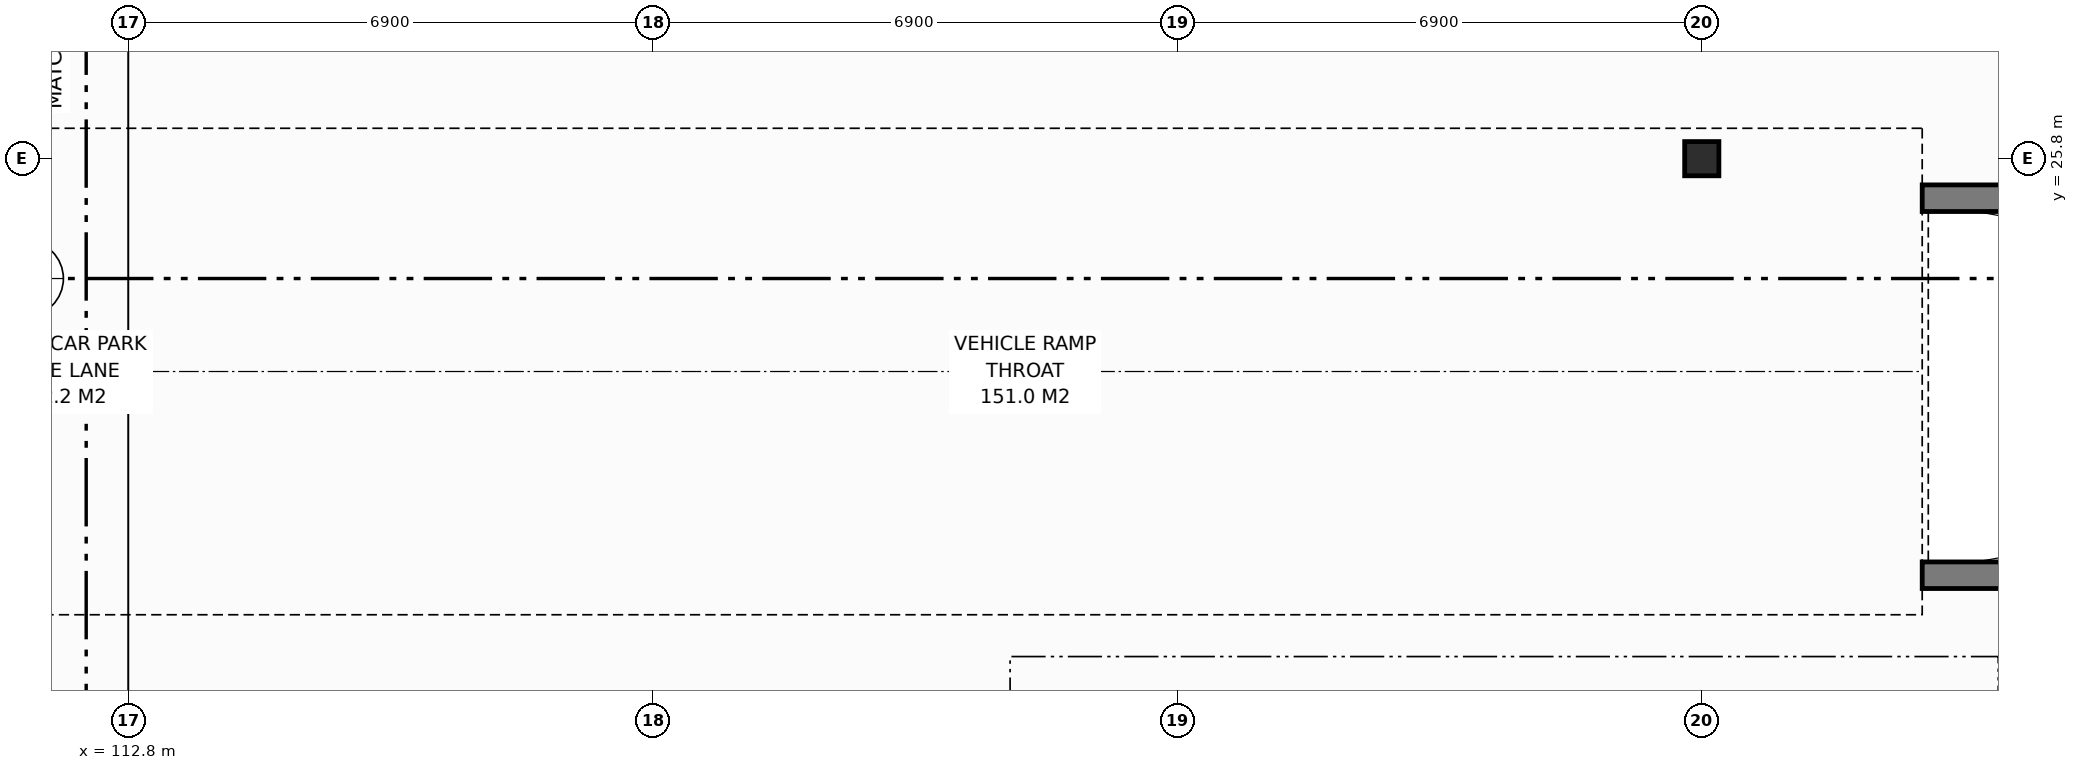
"""IFC4 building model, lengths in metres.
Left out: names, types, materials, properties, quantities, classifications, styles, units other than length and angle.
Written with IfcOpenShell. Run it as: python <this file> out.ifc"""

import sys

from ifc_helpers import new_model, si_unit, direction, frame, frame_2d, origin, origin_2d, place, context, subcontext, project, spatial, rectangle, extrude, element, save


model = new_model("IFC4")
c1 = context("Model", 3, precision=1e-05, world=origin(), true_north=direction((0.0, 1.0)))
c2 = subcontext(c1, "Body", "Model", "MODEL_VIEW")
j1 = project(units=[si_unit("LENGTHUNIT", "METRE"), si_unit("PLANEANGLEUNIT", "RADIAN")], contexts=[c1])
p1 = place(None, origin())
s1 = spatial("IfcSite", under=j1, at=p1, CompositionType="ELEMENT")
p2 = place(p1, origin())
s2 = spatial("IfcBuilding", under=s1, at=p2, CompositionType="ELEMENT")
p3 = place(p2, frame((0.0, 0.0, -3.8)))
s3 = spatial("IfcBuildingStorey", under=s2, at=p3, CompositionType="ELEMENT", Elevation=-3.8)
p4 = place(p3, frame((133.5, 25.8, 0.0), z_axis=(0.0, 0.0, 1.0), x_axis=(1.0, 0.0, 0.0)))
e1 = element("IfcColumn", 1, at=p4, inside=s3, PredefinedType="COLUMN", context=c2, shape_type="SweptSolid", body=[
    extrude(rectangle(XDim=0.45, YDim=0.45, at=origin_2d()), origin(), (0.0, 0.0, 1.0), 3.8),
])
for number, where, z_axis, x_axis in (
    (2, (136.4, 20.32, 0.0), (0.0, 0.0, 1.0), (1.0, 0.0, 0.0)),
    (3, (136.4, 25.28, 0.0), (0.0, 0.0, 1.0), (1.0, 0.0, 0.0)),
):
    element("IfcWall", number, at=place(p3, frame(where, z_axis=z_axis, x_axis=x_axis)), inside=s3, PredefinedType="STANDARD", context=c2, shape_type="SweptSolid", body=[
        extrude(rectangle(XDim=26.8, YDim=0.35, at=frame_2d((13.4, 0.0))), origin(), (0.0, 0.0, 1.0), 3.8),
    ])
save(model, sys.argv[1])
